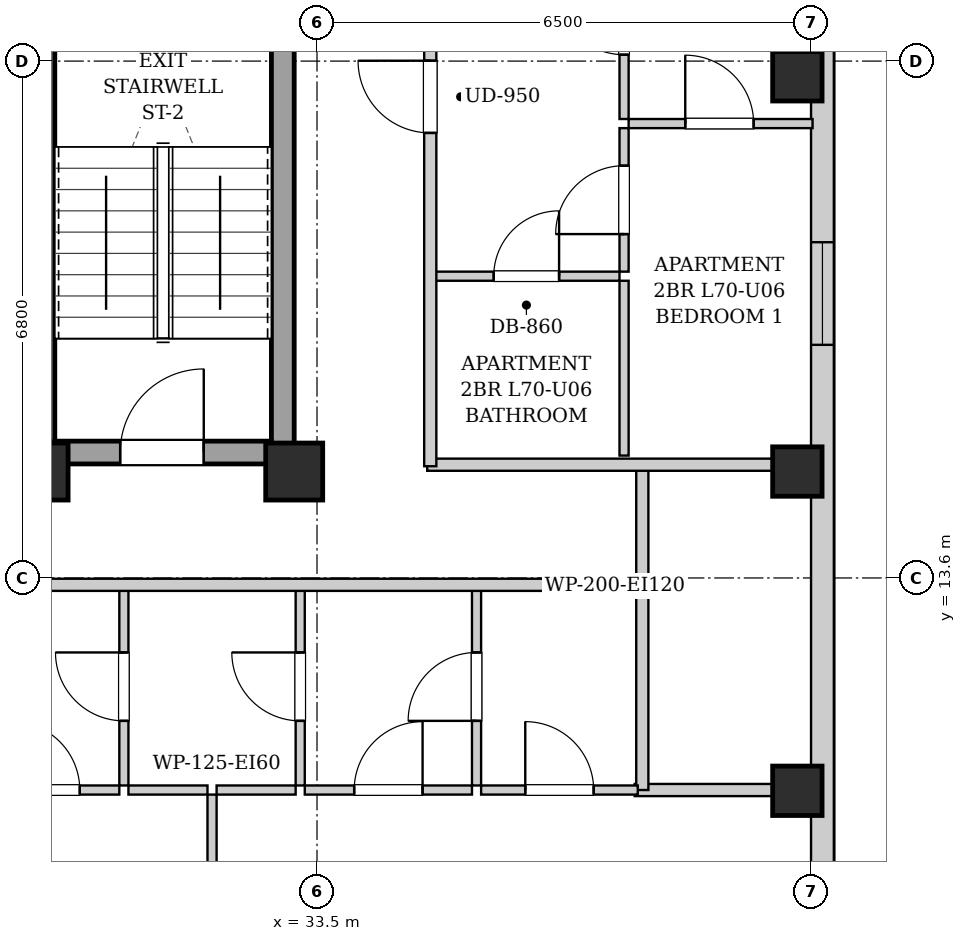
"""IFC4 building model, lengths in metres.
Left out: names, types, materials, properties, quantities, classifications, styles, units other than length and angle.
Written with IfcOpenShell. Run it as: python <this file> out.ifc"""

import sys

from ifc_helpers import new_model, si_unit, direction, frame, frame_2d, origin, origin_2d, place, context, subcontext, project, spatial, rectangle, extrude, element, fill, save


model = new_model("IFC4")
c1 = context("Model", 3, precision=1e-05, world=origin(), true_north=direction((0.0, 1.0)))
c2 = subcontext(c1, "Body", "Model", "MODEL_VIEW")
j1 = project(units=[si_unit("LENGTHUNIT", "METRE"), si_unit("PLANEANGLEUNIT", "RADIAN")], contexts=[c1])
p1 = place(None, origin())
s1 = spatial("IfcSite", under=j1, at=p1, CompositionType="ELEMENT")
p2 = place(p1, origin())
s2 = spatial("IfcBuilding", under=s1, at=p2, CompositionType="ELEMENT")
p3 = place(p2, frame((0.0, 0.0, 241.1)))
s3 = spatial("IfcBuildingStorey", under=s2, at=p3, CompositionType="ELEMENT", Elevation=241.1)
for number, where, z_axis, x_axis in (
    (1, (39.82, 10.8, 0.0), (0.0, 0.0, 1.0), (1.0, 0.0, 0.0)),
    (2, (39.82, 15.0, 0.0), (0.0, 0.0, 1.0), (1.0, 0.0, 0.0)),
    (3, (39.82, 20.2, 0.0), (0.0, 0.0, 1.0), (1.0, 0.0, 0.0)),
):
    element("IfcColumn", number, at=place(p3, frame(where, z_axis=z_axis, x_axis=x_axis)), inside=s3, PredefinedType="COLUMN", context=c2, shape_type="SweptSolid", body=[
        extrude(rectangle(XDim=0.65, YDim=0.65, at=origin_2d()), origin(), (0.0, 0.0, 1.0), 3.4),
    ])
for number, where, z_axis, x_axis in (
    (4, (29.85, 15.0, 0.0), (0.0, 0.0, 1.0), (1.0, 0.0, 0.0)),
    (5, (33.2, 15.0, 0.0), (0.0, 0.0, 1.0), (1.0, 0.0, 0.0)),
):
    element("IfcColumn", number, at=place(p3, frame(where, z_axis=z_axis, x_axis=x_axis)), inside=s3, PredefinedType="COLUMN", context=c2, shape_type="SweptSolid", body=[
        extrude(rectangle(XDim=0.75, YDim=0.75, at=origin_2d()), origin(), (0.0, 0.0, 1.0), 3.4),
    ])
p4 = place(p3, frame((40.15, 37.7, 0.0), z_axis=(0.0, 0.0, 1.0), x_axis=(0.0, -1.0, 0.0)))
e6 = element("IfcWall", 6, at=p4, inside=s3, PredefinedType="SOLIDWALL", context=c2, shape_type="SweptSolid", body=[
    extrude(rectangle(XDim=31.4, YDim=0.3, at=frame_2d((15.7, 0.0))), origin(), (0.0, 0.0, 1.0), 3.14),
])
p5 = place(p4, frame((28.396, 0.0, 0.55)))
e7 = element("IfcOpeningElement", 7, at=p5, cuts=e6, PredefinedType="OPENING", context=c2, shape_type="SweptSolid", body=[
    extrude(rectangle(XDim=1.35, YDim=1.2, at=frame_2d((0.675, 0.6))), frame((0.0, 0.16, 0.0), z_axis=(0.0, -1.0, 0.0), x_axis=(1.0, 0.0, 0.0)), (0.0, 0.0, 1.0), 0.32),
])
p6 = place(p4, frame((1.653, 0.0, 0.55)))
e8 = element("IfcOpeningElement", 8, at=p6, cuts=e6, PredefinedType="OPENING", context=c2, shape_type="SweptSolid", body=[
    extrude(rectangle(XDim=1.35, YDim=1.2, at=frame_2d((0.675, 0.6))), frame((0.0, 0.16, 0.0), z_axis=(0.0, -1.0, 0.0), x_axis=(1.0, 0.0, 0.0)), (0.0, 0.0, 1.0), 0.32),
])
p7 = place(p4, frame((19.683, 0.0, 0.55)))
e9 = element("IfcOpeningElement", 9, at=p7, cuts=e6, PredefinedType="OPENING", context=c2, shape_type="SweptSolid", body=[
    extrude(rectangle(XDim=1.35, YDim=1.2, at=frame_2d((0.675, 0.6))), frame((0.0, 0.16, 0.0), z_axis=(0.0, -1.0, 0.0), x_axis=(1.0, 0.0, 0.0)), (0.0, 0.0, 1.0), 0.32),
])
p8 = place(p4, frame((10.367, 0.0, 0.55)))
e10 = element("IfcOpeningElement", 10, at=p8, cuts=e6, PredefinedType="OPENING", context=c2, shape_type="SweptSolid", body=[
    extrude(rectangle(XDim=1.35, YDim=1.2, at=frame_2d((0.675, 0.6))), frame((0.0, 0.16, 0.0), z_axis=(0.0, -1.0, 0.0), x_axis=(1.0, 0.0, 0.0)), (0.0, 0.0, 1.0), 0.32),
])
for number, where, z_axis, x_axis in (
    (11, (29.9, 15.1, 0.0), (0.0, 0.0, 1.0), (0.0, 1.0, 0.0)),
    (12, (33.05, 15.1, 0.0), (0.0, 0.0, 1.0), (0.0, 1.0, 0.0)),
):
    element("IfcWall", number, at=place(p3, frame(where, z_axis=z_axis, x_axis=x_axis)), inside=s3, PredefinedType="SHEAR", context=c2, shape_type="SweptSolid", body=[
        extrude(rectangle(XDim=9.0, YDim=0.3, at=frame_2d((4.5, 0.0))), origin(), (0.0, 0.0, 1.0), 3.14),
    ])
p9 = place(p3, frame((30.05, 15.25, 0.0), z_axis=(0.0, 0.0, 1.0), x_axis=(1.0, 0.0, 0.0)))
e13 = element("IfcWall", 13, at=p9, inside=s3, PredefinedType="SHEAR", context=c2, shape_type="SweptSolid", body=[
    extrude(rectangle(XDim=2.85, YDim=0.3, at=frame_2d((1.425, 0.0))), origin(), (0.0, 0.0, 1.0), 3.14),
])
p10 = place(p9, frame((0.86, 0.0, 0.0)))
e14 = element("IfcOpeningElement", 14, at=p10, cuts=e13, PredefinedType="OPENING", context=c2, shape_type="SweptSolid", body=[
    extrude(rectangle(XDim=1.1, YDim=2.05, at=frame_2d((0.55, 1.025))), frame((0.0, 0.16, 0.0), z_axis=(0.0, -1.0, 0.0), x_axis=(1.0, 0.0, 0.0)), (0.0, 0.0, 1.0), 0.32),
])
p11 = place(p3, frame((37.78, 13.51, 0.0), z_axis=(0.0, 0.0, 1.0), x_axis=(0.0, 1.0, 0.0)))
e15 = element("IfcWall", 15, at=p11, inside=s3, PredefinedType="PARTITIONING", context=c2, shape_type="SweptSolid", body=[
    extrude(rectangle(XDim=1.58, YDim=0.16, at=frame_2d((0.79, 0.0))), origin(), (0.0, 0.0, 1.0), 3.14),
])
p12 = place(p3, frame((34.95, 15.09, 0.0), z_axis=(0.0, 0.0, 1.0), x_axis=(1.0, 0.0, 0.0)))
e16 = element("IfcWall", 16, at=p12, inside=s3, PredefinedType="PARTITIONING", context=c2, shape_type="SweptSolid", body=[
    extrude(rectangle(XDim=5.07, YDim=0.16, at=frame_2d((2.535, 0.0))), origin(), (0.0, 0.0, 1.0), 2.668),
])
p13 = place(p3, frame((37.68, 10.81, 0.0), z_axis=(0.0, 0.0, 1.0), x_axis=(1.0, 0.0, 0.0)))
e17 = element("IfcWall", 17, at=p13, inside=s3, PredefinedType="PARTITIONING", context=c2, shape_type="SweptSolid", body=[
    extrude(rectangle(XDim=2.34, YDim=0.16, at=frame_2d((1.17, 0.0))), origin(), (0.0, 0.0, 1.0), 3.14),
])
p14 = place(p3, frame((37.78, 10.81, 0.0), z_axis=(0.0, 0.0, 1.0), x_axis=(0.0, 1.0, 0.0)))
e18 = element("IfcWall", 18, at=p14, inside=s3, PredefinedType="PARTITIONING", context=c2, shape_type="SweptSolid", body=[
    extrude(rectangle(XDim=2.66, YDim=0.16, at=frame_2d((1.33, 0.0))), origin(), (0.0, 0.0, 1.0), 3.14),
])
p15 = place(p3, frame((30.959, 10.87, 0.0), z_axis=(0.0, 0.0, 1.0), x_axis=(0.0, 1.0, 0.0)))
e19 = element("IfcWall", 19, at=p15, inside=s3, PredefinedType="PARTITIONING", context=c2, shape_type="SweptSolid", body=[
    extrude(rectangle(XDim=2.6, YDim=0.12, at=frame_2d((1.3, 0.0))), origin(), (0.0, 0.0, 1.0), 3.14),
])
p16 = place(p15, frame((0.85, 0.0, 0.0)))
e20 = element("IfcOpeningElement", 20, at=p16, cuts=e19, PredefinedType="OPENING", context=c2, shape_type="SweptSolid", body=[
    extrude(rectangle(XDim=0.9, YDim=2.05, at=frame_2d((0.45, 1.025))), frame((0.0, 0.07, 0.0), z_axis=(0.0, -1.0, 0.0), x_axis=(1.0, 0.0, 0.0)), (0.0, 0.0, 1.0), 0.14),
])
p17 = place(p3, frame((28.959, 10.81, 0.0), z_axis=(0.0, 0.0, 1.0), x_axis=(1.0, 0.0, 0.0)))
e21 = element("IfcWall", 21, at=p17, inside=s3, PredefinedType="PARTITIONING", context=c2, shape_type="SweptSolid", body=[
    extrude(rectangle(XDim=1.94, YDim=0.12, at=frame_2d((0.97, 0.0))), origin(), (0.0, 0.0, 1.0), 3.14),
])
p18 = place(p17, frame((0.52, 0.0, 0.0)))
e22 = element("IfcOpeningElement", 22, at=p18, cuts=e21, PredefinedType="OPENING", context=c2, shape_type="SweptSolid", body=[
    extrude(rectangle(XDim=0.9, YDim=2.05, at=frame_2d((0.45, 1.025))), frame((0.0, 0.07, 0.0), z_axis=(0.0, -1.0, 0.0), x_axis=(1.0, 0.0, 0.0)), (0.0, 0.0, 1.0), 0.14),
])
p19 = place(p3, frame((33.279, 10.87, 0.0), z_axis=(0.0, 0.0, 1.0), x_axis=(0.0, 1.0, 0.0)))
e23 = element("IfcWall", 23, at=p19, inside=s3, PredefinedType="PARTITIONING", context=c2, shape_type="SweptSolid", body=[
    extrude(rectangle(XDim=2.6, YDim=0.12, at=frame_2d((1.3, 0.0))), origin(), (0.0, 0.0, 1.0), 2.668),
])
p20 = place(p19, frame((0.85, 0.0, 0.0)))
e24 = element("IfcOpeningElement", 24, at=p20, cuts=e23, PredefinedType="OPENING", context=c2, shape_type="SweptSolid", body=[
    extrude(rectangle(XDim=0.9, YDim=2.05, at=frame_2d((0.45, 1.025))), frame((0.0, 0.07, 0.0), z_axis=(0.0, -1.0, 0.0), x_axis=(1.0, 0.0, 0.0)), (0.0, 0.0, 1.0), 0.14),
])
for number, where, z_axis, x_axis in (
    (25, (31.019, 10.81, 0.0), (0.0, 0.0, 1.0), (1.0, 0.0, 0.0)),
    (26, (32.179, 10.81, 0.0), (0.0, 0.0, 1.0), (1.0, 0.0, 0.0)),
):
    element("IfcWall", number, at=place(p3, frame(where, z_axis=z_axis, x_axis=x_axis)), inside=s3, PredefinedType="PARTITIONING", context=c2, shape_type="SweptSolid", body=[
        extrude(rectangle(XDim=1.04, YDim=0.12, at=frame_2d((0.52, 0.0))), origin(), (0.0, 0.0, 1.0), 3.14),
    ])
p21 = place(p3, frame((35.599, 10.87, 0.0), z_axis=(0.0, 0.0, 1.0), x_axis=(0.0, 1.0, 0.0)))
e27 = element("IfcWall", 27, at=p21, inside=s3, PredefinedType="PARTITIONING", context=c2, shape_type="SweptSolid", body=[
    extrude(rectangle(XDim=2.6, YDim=0.12, at=frame_2d((1.3, 0.0))), origin(), (0.0, 0.0, 1.0), 3.14),
])
p22 = place(p21, frame((0.85, 0.0, 0.0)))
e28 = element("IfcOpeningElement", 28, at=p22, cuts=e27, PredefinedType="OPENING", context=c2, shape_type="SweptSolid", body=[
    extrude(rectangle(XDim=0.9, YDim=2.05, at=frame_2d((0.45, 1.025))), frame((0.0, 0.07, 0.0), z_axis=(0.0, -1.0, 0.0), x_axis=(1.0, 0.0, 0.0)), (0.0, 0.0, 1.0), 0.14),
])
p23 = place(p3, frame((33.339, 10.81, 0.0), z_axis=(0.0, 0.0, 1.0), x_axis=(1.0, 0.0, 0.0)))
e29 = element("IfcWall", 29, at=p23, inside=s3, PredefinedType="PARTITIONING", context=c2, shape_type="SweptSolid", body=[
    extrude(rectangle(XDim=2.2, YDim=0.12, at=frame_2d((1.1, 0.0))), origin(), (0.0, 0.0, 1.0), 3.14),
])
p24 = place(p23, frame((0.65, 0.0, 0.0)))
e30 = element("IfcOpeningElement", 30, at=p24, cuts=e29, PredefinedType="OPENING", context=c2, shape_type="SweptSolid", body=[
    extrude(rectangle(XDim=0.9, YDim=2.05, at=frame_2d((0.45, 1.025))), frame((0.0, 0.07, 0.0), z_axis=(0.0, -1.0, 0.0), x_axis=(1.0, 0.0, 0.0)), (0.0, 0.0, 1.0), 0.14),
])
p25 = place(p3, frame((35.659, 10.81, 0.0), z_axis=(0.0, 0.0, 1.0), x_axis=(1.0, 0.0, 0.0)))
e31 = element("IfcWall", 31, at=p25, inside=s3, PredefinedType="PARTITIONING", context=c2, shape_type="SweptSolid", body=[
    extrude(rectangle(XDim=2.061, YDim=0.12, at=frame_2d((1.031, 0.0))), origin(), (0.0, 0.0, 1.0), 3.14),
])
p26 = place(p25, frame((0.581, 0.0, 0.0)))
e32 = element("IfcOpeningElement", 32, at=p26, cuts=e31, PredefinedType="OPENING", context=c2, shape_type="SweptSolid", body=[
    extrude(rectangle(XDim=0.9, YDim=2.05, at=frame_2d((0.45, 1.025))), frame((0.0, 0.07, 0.0), z_axis=(0.0, -1.0, 0.0), x_axis=(1.0, 0.0, 0.0)), (0.0, 0.0, 1.0), 0.14),
])
p27 = place(p3, frame((32.119, 6.23, 0.0), z_axis=(0.0, 0.0, 1.0), x_axis=(0.0, 1.0, 0.0)))
e33 = element("IfcWall", 33, at=p27, inside=s3, PredefinedType="PARTITIONING", context=c2, shape_type="SweptSolid", body=[
    extrude(rectangle(XDim=4.52, YDim=0.12, at=frame_2d((2.26, 0.0))), origin(), (0.0, 0.0, 1.0), 3.14),
])
p28 = place(p27, frame((1.81, 0.0, 0.0)))
e34 = element("IfcOpeningElement", 34, at=p28, cuts=e33, PredefinedType="OPENING", context=c2, shape_type="SweptSolid", body=[
    extrude(rectangle(XDim=0.9, YDim=2.05, at=frame_2d((0.45, 1.025))), frame((0.0, 0.07, 0.0), z_axis=(0.0, -1.0, 0.0), x_axis=(1.0, 0.0, 0.0)), (0.0, 0.0, 1.0), 0.14),
])
p29 = place(p3, frame((35.03, 17.57, 0.0), z_axis=(0.0, 0.0, 1.0), x_axis=(1.0, 0.0, 0.0)))
e35 = element("IfcWall", 35, at=p29, inside=s3, PredefinedType="PARTITIONING", context=c2, shape_type="SweptSolid", body=[
    extrude(rectangle(XDim=2.45, YDim=0.12, at=frame_2d((1.225, 0.0))), origin(), (0.0, 0.0, 1.0), 3.14),
])
p30 = place(p29, frame((0.795, 0.0, 0.0)))
e36 = element("IfcOpeningElement", 36, at=p30, cuts=e35, PredefinedType="OPENING", context=c2, shape_type="SweptSolid", body=[
    extrude(rectangle(XDim=0.86, YDim=2.05, at=frame_2d((0.43, 1.025))), frame((0.0, 0.07, 0.0), z_axis=(0.0, -1.0, 0.0), x_axis=(1.0, 0.0, 0.0)), (0.0, 0.0, 1.0), 0.14),
])
p31 = place(p3, frame((37.54, 15.21, 0.0), z_axis=(0.0, 0.0, 1.0), x_axis=(0.0, 1.0, 0.0)))
e37 = element("IfcWall", 37, at=p31, inside=s3, PredefinedType="PARTITIONING", context=c2, shape_type="SweptSolid", body=[
    extrude(rectangle(XDim=2.3, YDim=0.12, at=frame_2d((1.15, 0.0))), origin(), (0.0, 0.0, 1.0), 3.14),
])
p32 = place(p3, frame((37.54, 17.63, 0.0), z_axis=(0.0, 0.0, 1.0), x_axis=(0.0, 1.0, 0.0)))
e38 = element("IfcWall", 38, at=p32, inside=s3, PredefinedType="PARTITIONING", context=c2, shape_type="SweptSolid", body=[
    extrude(rectangle(XDim=1.888, YDim=0.12, at=frame_2d((0.944, 0.0))), origin(), (0.0, 0.0, 1.0), 3.14),
])
p33 = place(p32, frame((0.494, 0.0, 0.0)))
e39 = element("IfcOpeningElement", 39, at=p33, cuts=e38, PredefinedType="OPENING", context=c2, shape_type="SweptSolid", body=[
    extrude(rectangle(XDim=0.9, YDim=2.05, at=frame_2d((0.45, 1.025))), frame((0.0, 0.07, 0.0), z_axis=(0.0, -1.0, 0.0), x_axis=(1.0, 0.0, 0.0)), (0.0, 0.0, 1.0), 0.14),
])
p34 = place(p3, frame((37.54, 19.638, 0.0), z_axis=(0.0, 0.0, 1.0), x_axis=(0.0, 1.0, 0.0)))
e40 = element("IfcWall", 40, at=p34, inside=s3, PredefinedType="PARTITIONING", context=c2, shape_type="SweptSolid", body=[
    extrude(rectangle(XDim=2.592, YDim=0.12, at=frame_2d((1.296, 0.0))), origin(), (0.0, 0.0, 1.0), 3.14),
])
p35 = place(p34, frame((0.846, 0.0, 0.0)))
e41 = element("IfcOpeningElement", 41, at=p35, cuts=e40, PredefinedType="OPENING", context=c2, shape_type="SweptSolid", body=[
    extrude(rectangle(XDim=0.9, YDim=2.05, at=frame_2d((0.45, 1.025))), frame((0.0, 0.07, 0.0), z_axis=(0.0, -1.0, 0.0), x_axis=(1.0, 0.0, 0.0)), (0.0, 0.0, 1.0), 0.14),
])
p36 = place(p3, frame((37.6, 19.578, 0.0), z_axis=(0.0, 0.0, 1.0), x_axis=(1.0, 0.0, 0.0)))
e42 = element("IfcWall", 42, at=p36, inside=s3, PredefinedType="PARTITIONING", context=c2, shape_type="SweptSolid", body=[
    extrude(rectangle(XDim=2.42, YDim=0.12, at=frame_2d((1.21, 0.0))), origin(), (0.0, 0.0, 1.0), 3.14),
])
p37 = place(p36, frame((0.745, 0.0, 0.0)))
e43 = element("IfcOpeningElement", 43, at=p37, cuts=e42, PredefinedType="OPENING", context=c2, shape_type="SweptSolid", body=[
    extrude(rectangle(XDim=0.9, YDim=2.05, at=frame_2d((0.45, 1.025))), frame((0.0, 0.07, 0.0), z_axis=(0.0, -1.0, 0.0), x_axis=(1.0, 0.0, 0.0)), (0.0, 0.0, 1.0), 0.14),
])
p38 = place(p3, frame((13.15, 13.51, 0.0), z_axis=(0.0, 0.0, 1.0), x_axis=(1.0, 0.0, 0.0)))
e44 = element("IfcWall", 44, at=p38, inside=s3, PredefinedType="PARTITIONING", context=c2, shape_type="SweptSolid", body=[
    extrude(rectangle(XDim=24.6, YDim=0.16, at=frame_2d((12.3, 0.0))), origin(), (0.0, 0.0, 1.0), 3.14),
])
p39 = place(p38, frame((3.165, 0.0, 0.0)))
e45 = element("IfcOpeningElement", 45, at=p39, cuts=e44, PredefinedType="OPENING", context=c2, shape_type="SweptSolid", body=[
    extrude(rectangle(XDim=0.95, YDim=2.1, at=frame_2d((0.475, 1.05))), frame((0.0, 0.09, 0.0), z_axis=(0.0, -1.0, 0.0), x_axis=(1.0, 0.0, 0.0)), (0.0, 0.0, 1.0), 0.18),
])
p40 = place(p38, frame((10.414, 0.0, 0.0)))
e46 = element("IfcOpeningElement", 46, at=p40, cuts=e44, PredefinedType="OPENING", context=c2, shape_type="SweptSolid", body=[
    extrude(rectangle(XDim=0.95, YDim=2.1, at=frame_2d((0.475, 1.05))), frame((0.0, 0.09, 0.0), z_axis=(0.0, -1.0, 0.0), x_axis=(1.0, 0.0, 0.0)), (0.0, 0.0, 1.0), 0.18),
])
p41 = place(p3, frame((34.99, 15.07, 0.0), z_axis=(0.0, 0.0, 1.0), x_axis=(0.0, 1.0, 0.0)))
e47 = element("IfcWall", 47, at=p41, inside=s3, PredefinedType="PARTITIONING", context=c2, shape_type="SweptSolid", body=[
    extrude(rectangle(XDim=13.93, YDim=0.16, at=frame_2d((6.965, 0.0))), origin(), (0.0, 0.0, 1.0), 3.14),
])
p42 = place(p41, frame((4.385, 0.0, 0.0)))
e48 = element("IfcOpeningElement", 48, at=p42, cuts=e47, PredefinedType="OPENING", context=c2, shape_type="SweptSolid", body=[
    extrude(rectangle(XDim=0.95, YDim=2.1, at=frame_2d((0.475, 1.05))), frame((0.0, 0.09, 0.0), z_axis=(0.0, -1.0, 0.0), x_axis=(1.0, 0.0, 0.0)), (0.0, 0.0, 1.0), 0.18),
])
p43 = place(p10, origin())
e49 = element("IfcDoor", 49, at=p43, inside=s3, OperationType="SINGLE_SWING_RIGHT", PredefinedType="DOOR", context=c2, shape_type="SweptSolid", body=[
    extrude(rectangle(XDim=1.1, YDim=2.05, at=frame_2d((0.55, 1.025))), frame((0.0, 0.025, 0.0), z_axis=(0.0, -1.0, 0.0), x_axis=(1.0, 0.0, 0.0)), (0.0, 0.0, 1.0), 0.05),
])
fill(e14, e49)
p44 = place(p16, origin())
e50 = element("IfcDoor", 50, at=p44, inside=s3, OperationType="SINGLE_SWING_RIGHT", PredefinedType="DOOR", context=c2, shape_type="SweptSolid", body=[
    extrude(rectangle(XDim=0.9, YDim=2.05, at=frame_2d((0.45, 1.025))), frame((0.0, 0.025, 0.0), z_axis=(0.0, -1.0, 0.0), x_axis=(1.0, 0.0, 0.0)), (0.0, 0.0, 1.0), 0.05),
])
fill(e20, e50)
p45 = place(p18, origin())
e51 = element("IfcDoor", 51, at=p45, inside=s3, OperationType="SINGLE_SWING_LEFT", PredefinedType="DOOR", context=c2, shape_type="SweptSolid", body=[
    extrude(rectangle(XDim=0.9, YDim=2.05, at=frame_2d((0.45, 1.025))), frame((0.0, 0.025, 0.0), z_axis=(0.0, -1.0, 0.0), x_axis=(1.0, 0.0, 0.0)), (0.0, 0.0, 1.0), 0.05),
])
fill(e22, e51)
p46 = place(p20, origin())
e52 = element("IfcDoor", 52, at=p46, inside=s3, OperationType="SINGLE_SWING_RIGHT", PredefinedType="DOOR", context=c2, shape_type="SweptSolid", body=[
    extrude(rectangle(XDim=0.9, YDim=2.05, at=frame_2d((0.45, 1.025))), frame((0.0, 0.025, 0.0), z_axis=(0.0, -1.0, 0.0), x_axis=(1.0, 0.0, 0.0)), (0.0, 0.0, 1.0), 0.05),
])
fill(e24, e52)
p47 = place(p22, origin())
e53 = element("IfcDoor", 53, at=p47, inside=s3, OperationType="SINGLE_SWING_LEFT", PredefinedType="DOOR", context=c2, shape_type="SweptSolid", body=[
    extrude(rectangle(XDim=0.9, YDim=2.05, at=frame_2d((0.45, 1.025))), frame((0.0, 0.025, 0.0), z_axis=(0.0, -1.0, 0.0), x_axis=(1.0, 0.0, 0.0)), (0.0, 0.0, 1.0), 0.05),
])
fill(e28, e53)
p48 = place(p24, origin())
e54 = element("IfcDoor", 54, at=p48, inside=s3, OperationType="SINGLE_SWING_RIGHT", PredefinedType="DOOR", context=c2, shape_type="SweptSolid", body=[
    extrude(rectangle(XDim=0.9, YDim=2.05, at=frame_2d((0.45, 1.025))), frame((0.0, 0.025, 0.0), z_axis=(0.0, -1.0, 0.0), x_axis=(1.0, 0.0, 0.0)), (0.0, 0.0, 1.0), 0.05),
])
fill(e30, e54)
p49 = place(p26, origin())
e55 = element("IfcDoor", 55, at=p49, inside=s3, OperationType="SINGLE_SWING_LEFT", PredefinedType="DOOR", context=c2, shape_type="SweptSolid", body=[
    extrude(rectangle(XDim=0.9, YDim=2.05, at=frame_2d((0.45, 1.025))), frame((0.0, 0.025, 0.0), z_axis=(0.0, -1.0, 0.0), x_axis=(1.0, 0.0, 0.0)), (0.0, 0.0, 1.0), 0.05),
])
fill(e32, e55)
p50 = place(p30, origin())
e56 = element("IfcDoor", 56, at=p50, inside=s3, OperationType="SINGLE_SWING_RIGHT", PredefinedType="DOOR", context=c2, shape_type="SweptSolid", body=[
    extrude(rectangle(XDim=0.86, YDim=2.05, at=frame_2d((0.43, 1.025))), frame((0.0, 0.025, 0.0), z_axis=(0.0, -1.0, 0.0), x_axis=(1.0, 0.0, 0.0)), (0.0, 0.0, 1.0), 0.05),
])
fill(e36, e56)
p51 = place(p33, origin())
e57 = element("IfcDoor", 57, at=p51, inside=s3, OperationType="SINGLE_SWING_LEFT", PredefinedType="DOOR", context=c2, shape_type="SweptSolid", body=[
    extrude(rectangle(XDim=0.9, YDim=2.05, at=frame_2d((0.45, 1.025))), frame((0.0, 0.025, 0.0), z_axis=(0.0, -1.0, 0.0), x_axis=(1.0, 0.0, 0.0)), (0.0, 0.0, 1.0), 0.05),
])
fill(e39, e57)
p52 = place(p35, origin())
e58 = element("IfcDoor", 58, at=p52, inside=s3, OperationType="SINGLE_SWING_RIGHT", PredefinedType="DOOR", context=c2, shape_type="SweptSolid", body=[
    extrude(rectangle(XDim=0.9, YDim=2.05, at=frame_2d((0.45, 1.025))), frame((0.0, 0.025, 0.0), z_axis=(0.0, -1.0, 0.0), x_axis=(1.0, 0.0, 0.0)), (0.0, 0.0, 1.0), 0.05),
])
fill(e41, e58)
p53 = place(p37, origin())
e59 = element("IfcDoor", 59, at=p53, inside=s3, OperationType="SINGLE_SWING_LEFT", PredefinedType="DOOR", context=c2, shape_type="SweptSolid", body=[
    extrude(rectangle(XDim=0.9, YDim=2.05, at=frame_2d((0.45, 1.025))), frame((0.0, 0.025, 0.0), z_axis=(0.0, -1.0, 0.0), x_axis=(1.0, 0.0, 0.0)), (0.0, 0.0, 1.0), 0.05),
])
fill(e43, e59)
p54 = place(p42, origin())
e60 = element("IfcDoor", 60, at=p54, inside=s3, OperationType="SINGLE_SWING_RIGHT", PredefinedType="DOOR", context=c2, shape_type="SweptSolid", body=[
    extrude(rectangle(XDim=0.95, YDim=2.1, at=frame_2d((0.475, 1.05))), frame((0.0, 0.025, 0.0), z_axis=(0.0, -1.0, 0.0), x_axis=(1.0, 0.0, 0.0)), (0.0, 0.0, 1.0), 0.05),
])
fill(e48, e60)
p55 = place(p7, origin())
e61 = element("IfcWindow", 61, at=p55, inside=s3, PartitioningType="SINGLE_PANEL", PredefinedType="WINDOW", context=c2, shape_type="SweptSolid", body=[
    extrude(rectangle(XDim=1.35, YDim=1.2, at=frame_2d((0.675, 0.6))), frame((0.0, 0.03, 0.0), z_axis=(0.0, -1.0, 0.0), x_axis=(1.0, 0.0, 0.0)), (0.0, 0.0, 1.0), 0.06),
])
fill(e9, e61)
save(model, sys.argv[1])
